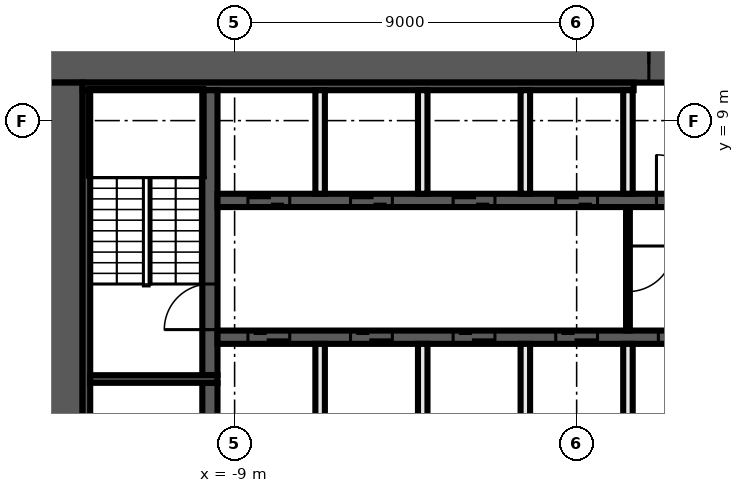
"""IFC4 building model, lengths in metres.
Left out: names, types, materials, properties, quantities, classifications, styles, units other than length and angle.
Written with IfcOpenShell. Run it as: python <this file> out.ifc"""

import sys

from ifc_helpers import new_model, si_unit, direction, frame, frame_2d, origin, place, context, subcontext, project, spatial, rectangle, extrude, element, fill, save


model = new_model("IFC4")
c1 = context("Model", 3, precision=1e-05, world=origin(), true_north=direction((0.0, 1.0)))
c2 = subcontext(c1, "Body", "Model", "MODEL_VIEW")
j1 = project(units=[si_unit("LENGTHUNIT", "METRE"), si_unit("PLANEANGLEUNIT", "RADIAN")], contexts=[c1])
p1 = place(None, origin())
s1 = spatial("IfcSite", under=j1, at=p1, CompositionType="ELEMENT")
p2 = place(p1, origin())
s2 = spatial("IfcBuilding", under=s1, at=p2, CompositionType="ELEMENT")
p3 = place(p2, frame((0.0, 0.0, 98.9)))
s3 = spatial("IfcBuildingStorey", under=s2, at=p3, CompositionType="ELEMENT", Elevation=98.9)
p4 = place(p3, frame((-14.0, 10.5, 0.0), z_axis=(0.0, 0.0, 1.0), x_axis=(1.0, 0.0, 0.0)))
e1 = element("IfcWall", 1, at=p4, inside=s3, PredefinedType="SHEAR", context=c2, shape_type="SweptSolid", body=[
    extrude(rectangle(XDim=28.0, YDim=1.0, at=frame_2d((14.0, 0.0))), origin(), (0.0, 0.0, 1.0), 3.25),
])
p5 = place(p4, frame((15.9, 0.0, 0.0)))
e2 = element("IfcOpeningElement", 2, at=p5, cuts=e1, PredefinedType="OPENING", context=c2, shape_type="SweptSolid", body=[
    extrude(rectangle(XDim=1.6, YDim=2.1, at=frame_2d((0.8, 1.05))), frame((0.0, 0.51, 0.0), z_axis=(0.0, -1.0, 0.0), x_axis=(1.0, 0.0, 0.0)), (0.0, 0.0, 1.0), 1.02),
])
p6 = place(p3, frame((-13.5, -10.0, 0.0), z_axis=(0.0, 0.0, 1.0), x_axis=(0.0, 1.0, 0.0)))
e3 = element("IfcWall", 3, at=p6, inside=s3, PredefinedType="SHEAR", context=c2, shape_type="SweptSolid", body=[
    extrude(rectangle(XDim=20.0, YDim=1.0, at=frame_2d((10.0, 0.0))), origin(), (0.0, 0.0, 1.0), 3.25),
])
p7 = place(p3, frame((-13.0, 9.9, 0.0), z_axis=(0.0, 0.0, 1.0), x_axis=(1.0, 0.0, 0.0)))
e4 = element("IfcWall", 4, at=p7, inside=s3, PredefinedType="SHEAR", context=c2, shape_type="SweptSolid", body=[
    extrude(rectangle(XDim=14.5, YDim=0.2, at=frame_2d((7.25, 0.0))), origin(), (0.0, 0.0, 1.0), 3.25),
])
p8 = place(p3, frame((-12.9, -9.8, 0.0), z_axis=(0.0, 0.0, 1.0), x_axis=(0.0, 1.0, 0.0)))
e5 = element("IfcWall", 5, at=p8, inside=s3, PredefinedType="SHEAR", context=c2, shape_type="SweptSolid", body=[
    extrude(rectangle(XDim=19.6, YDim=0.2, at=frame_2d((9.8, 0.0))), origin(), (0.0, 0.0, 1.0), 3.25),
])
p9 = place(p3, frame((-9.65, -2.1, 0.0), z_axis=(0.0, 0.0, 1.0), x_axis=(0.0, 1.0, 0.0)))
e6 = element("IfcWall", 6, at=p9, inside=s3, PredefinedType="SHEAR", context=c2, shape_type="SweptSolid", body=[
    extrude(rectangle(XDim=4.2, YDim=0.4, at=frame_2d((2.1, 0.0))), origin(), (0.0, 0.0, 1.0), 3.25),
])
p10 = place(p3, frame((-9.65, 2.3, 0.0), z_axis=(0.0, 0.0, 1.0), x_axis=(0.0, 1.0, 0.0)))
e7 = element("IfcWall", 7, at=p10, inside=s3, PredefinedType="SHEAR", context=c2, shape_type="SweptSolid", body=[
    extrude(rectangle(XDim=7.5, YDim=0.4, at=frame_2d((3.75, 0.0))), origin(), (0.0, 0.0, 1.0), 3.25),
])
p11 = place(p10, frame((1.2, 0.0, 0.0)))
e8 = element("IfcOpeningElement", 8, at=p11, cuts=e7, PredefinedType="OPENING", context=c2, shape_type="SweptSolid", body=[
    extrude(rectangle(XDim=1.2, YDim=2.1, at=frame_2d((0.6, 1.05))), frame((0.0, 0.21, 0.0), z_axis=(0.0, -1.0, 0.0), x_axis=(1.0, 0.0, 0.0)), (0.0, 0.0, 1.0), 0.42),
])
p12 = place(p3, frame((-9.45, 2.2, 0.0), z_axis=(0.0, 0.0, 1.0), x_axis=(-1.0, 0.0, 0.0)))
e9 = element("IfcWall", 9, at=p12, inside=s3, PredefinedType="SHEAR", context=c2, shape_type="SweptSolid", body=[
    extrude(rectangle(XDim=3.35, YDim=0.2, at=frame_2d((1.675, 0.0))), origin(), (0.0, 0.0, 1.0), 3.25),
])
p13 = place(p3, frame((-9.45, 6.9, 0.0), z_axis=(0.0, 0.0, 1.0), x_axis=(1.0, 0.0, 0.0)))
e10 = element("IfcWall", 10, at=p13, inside=s3, PredefinedType="SHEAR", context=c2, shape_type="SweptSolid", body=[
    extrude(rectangle(XDim=18.9, YDim=0.35, at=frame_2d((9.45, 0.0))), origin(), (0.0, 0.0, 1.0), 3.25),
])
p14 = place(p13, frame((0.8, 0.0, 0.0)))
e11 = element("IfcOpeningElement", 11, at=p14, cuts=e10, PredefinedType="OPENING", context=c2, shape_type="SweptSolid", body=[
    extrude(rectangle(XDim=1.1, YDim=2.1, at=frame_2d((0.55, 1.05))), frame((0.0, 0.185, 0.0), z_axis=(0.0, -1.0, 0.0), x_axis=(1.0, 0.0, 0.0)), (0.0, 0.0, 1.0), 0.37),
])
p15 = place(p13, frame((3.5, 0.0, 0.0)))
e12 = element("IfcOpeningElement", 12, at=p15, cuts=e10, PredefinedType="OPENING", context=c2, shape_type="SweptSolid", body=[
    extrude(rectangle(XDim=1.1, YDim=2.1, at=frame_2d((0.55, 1.05))), frame((0.0, 0.185, 0.0), z_axis=(0.0, -1.0, 0.0), x_axis=(1.0, 0.0, 0.0)), (0.0, 0.0, 1.0), 0.37),
])
p16 = place(p13, frame((6.2, 0.0, 0.0)))
e13 = element("IfcOpeningElement", 13, at=p16, cuts=e10, PredefinedType="OPENING", context=c2, shape_type="SweptSolid", body=[
    extrude(rectangle(XDim=1.1, YDim=2.1, at=frame_2d((0.55, 1.05))), frame((0.0, 0.185, 0.0), z_axis=(0.0, -1.0, 0.0), x_axis=(1.0, 0.0, 0.0)), (0.0, 0.0, 1.0), 0.37),
])
p17 = place(p13, frame((8.9, 0.0, 0.0)))
e14 = element("IfcOpeningElement", 14, at=p17, cuts=e10, PredefinedType="OPENING", context=c2, shape_type="SweptSolid", body=[
    extrude(rectangle(XDim=1.1, YDim=2.1, at=frame_2d((0.55, 1.05))), frame((0.0, 0.185, 0.0), z_axis=(0.0, -1.0, 0.0), x_axis=(1.0, 0.0, 0.0)), (0.0, 0.0, 1.0), 0.37),
])
p18 = place(p13, frame((11.55, 0.0, 0.0)))
e15 = element("IfcOpeningElement", 15, at=p18, cuts=e10, PredefinedType="OPENING", context=c2, shape_type="SweptSolid", body=[
    extrude(rectangle(XDim=1.2, YDim=2.1, at=frame_2d((0.6, 1.05))), frame((0.0, 0.185, 0.0), z_axis=(0.0, -1.0, 0.0), x_axis=(1.0, 0.0, 0.0)), (0.0, 0.0, 1.0), 0.37),
])
p19 = place(p13, frame((14.3, 0.0, 0.0)))
e16 = element("IfcOpeningElement", 16, at=p19, cuts=e10, PredefinedType="OPENING", context=c2, shape_type="SweptSolid", body=[
    extrude(rectangle(XDim=1.1, YDim=2.1, at=frame_2d((0.55, 1.05))), frame((0.0, 0.185, 0.0), z_axis=(0.0, -1.0, 0.0), x_axis=(1.0, 0.0, 0.0)), (0.0, 0.0, 1.0), 0.37),
])
p20 = place(p13, frame((17.0, 0.0, 0.0)))
e17 = element("IfcOpeningElement", 17, at=p20, cuts=e10, PredefinedType="OPENING", context=c2, shape_type="SweptSolid", body=[
    extrude(rectangle(XDim=1.1, YDim=2.1, at=frame_2d((0.55, 1.05))), frame((0.0, 0.185, 0.0), z_axis=(0.0, -1.0, 0.0), x_axis=(1.0, 0.0, 0.0)), (0.0, 0.0, 1.0), 0.37),
])
p21 = place(p3, frame((9.45, 3.3, 0.0), z_axis=(0.0, 0.0, 1.0), x_axis=(-1.0, 0.0, 0.0)))
e18 = element("IfcWall", 18, at=p21, inside=s3, PredefinedType="SHEAR", context=c2, shape_type="SweptSolid", body=[
    extrude(rectangle(XDim=18.9, YDim=0.35, at=frame_2d((9.45, 0.0))), origin(), (0.0, 0.0, 1.0), 3.25),
])
p22 = place(p21, frame((17.0, 0.0, 0.0)))
e19 = element("IfcOpeningElement", 19, at=p22, cuts=e18, PredefinedType="OPENING", context=c2, shape_type="SweptSolid", body=[
    extrude(rectangle(XDim=1.1, YDim=2.1, at=frame_2d((0.55, 1.05))), frame((0.0, 0.185, 0.0), z_axis=(0.0, -1.0, 0.0), x_axis=(1.0, 0.0, 0.0)), (0.0, 0.0, 1.0), 0.37),
])
p23 = place(p21, frame((14.3, 0.0, 0.0)))
e20 = element("IfcOpeningElement", 20, at=p23, cuts=e18, PredefinedType="OPENING", context=c2, shape_type="SweptSolid", body=[
    extrude(rectangle(XDim=1.1, YDim=2.1, at=frame_2d((0.55, 1.05))), frame((0.0, 0.185, 0.0), z_axis=(0.0, -1.0, 0.0), x_axis=(1.0, 0.0, 0.0)), (0.0, 0.0, 1.0), 0.37),
])
p24 = place(p21, frame((11.6, 0.0, 0.0)))
e21 = element("IfcOpeningElement", 21, at=p24, cuts=e18, PredefinedType="OPENING", context=c2, shape_type="SweptSolid", body=[
    extrude(rectangle(XDim=1.1, YDim=2.1, at=frame_2d((0.55, 1.05))), frame((0.0, 0.185, 0.0), z_axis=(0.0, -1.0, 0.0), x_axis=(1.0, 0.0, 0.0)), (0.0, 0.0, 1.0), 0.37),
])
p25 = place(p21, frame((8.9, 0.0, 0.0)))
e22 = element("IfcOpeningElement", 22, at=p25, cuts=e18, PredefinedType="OPENING", context=c2, shape_type="SweptSolid", body=[
    extrude(rectangle(XDim=1.1, YDim=2.1, at=frame_2d((0.55, 1.05))), frame((0.0, 0.185, 0.0), z_axis=(0.0, -1.0, 0.0), x_axis=(1.0, 0.0, 0.0)), (0.0, 0.0, 1.0), 0.37),
])
p26 = place(p21, frame((6.2, 0.0, 0.0)))
e23 = element("IfcOpeningElement", 23, at=p26, cuts=e18, PredefinedType="OPENING", context=c2, shape_type="SweptSolid", body=[
    extrude(rectangle(XDim=1.1, YDim=2.1, at=frame_2d((0.55, 1.05))), frame((0.0, 0.185, 0.0), z_axis=(0.0, -1.0, 0.0), x_axis=(1.0, 0.0, 0.0)), (0.0, 0.0, 1.0), 0.37),
])
p27 = place(p21, frame((3.5, 0.0, 0.0)))
e24 = element("IfcOpeningElement", 24, at=p27, cuts=e18, PredefinedType="OPENING", context=c2, shape_type="SweptSolid", body=[
    extrude(rectangle(XDim=1.1, YDim=2.1, at=frame_2d((0.55, 1.05))), frame((0.0, 0.185, 0.0), z_axis=(0.0, -1.0, 0.0), x_axis=(1.0, 0.0, 0.0)), (0.0, 0.0, 1.0), 0.37),
])
p28 = place(p21, frame((0.9, 0.0, 0.0)))
e25 = element("IfcOpeningElement", 25, at=p28, cuts=e18, PredefinedType="OPENING", context=c2, shape_type="SweptSolid", body=[
    extrude(rectangle(XDim=0.9, YDim=2.1, at=frame_2d((0.45, 1.05))), frame((0.0, 0.185, 0.0), z_axis=(0.0, -1.0, 0.0), x_axis=(1.0, 0.0, 0.0)), (0.0, 0.0, 1.0), 0.37),
])
p29 = place(p3, frame((1.35, 6.725, 0.0), z_axis=(0.0, 0.0, 1.0), x_axis=(0.0, -1.0, 0.0)))
e26 = element("IfcWall", 26, at=p29, inside=s3, PredefinedType="PARTITIONING", context=c2, shape_type="SweptSolid", body=[
    extrude(rectangle(XDim=3.25, YDim=0.1, at=frame_2d((1.625, 0.0))), origin(), (0.0, 0.0, 1.0), 3.25),
])
p30 = place(p29, frame((1.025, 0.0, 0.0)))
e27 = element("IfcOpeningElement", 27, at=p30, cuts=e26, PredefinedType="OPENING", context=c2, shape_type="SweptSolid", body=[
    extrude(rectangle(XDim=1.2, YDim=2.1, at=frame_2d((0.6, 1.05))), frame((0.0, 0.06, 0.0), z_axis=(0.0, -1.0, 0.0), x_axis=(1.0, 0.0, 0.0)), (0.0, 0.0, 1.0), 0.12),
])
for number, where, z_axis, x_axis in (
    (28, (1.35, 0.4, 0.0), (0.0, 0.0, 1.0), (0.0, 1.0, 0.0)),
    (29, (1.35, 7.075, 0.0), (0.0, 0.0, 1.0), (0.0, 1.0, 0.0)),
    (30, (-1.35, 0.4, 0.0), (0.0, 0.0, 1.0), (0.0, 1.0, 0.0)),
    (31, (-1.35, 7.075, 0.0), (0.0, 0.0, 1.0), (0.0, 1.0, 0.0)),
    (32, (-4.05, 0.4, 0.0), (0.0, 0.0, 1.0), (0.0, 1.0, 0.0)),
    (33, (-4.05, 7.075, 0.0), (0.0, 0.0, 1.0), (0.0, 1.0, 0.0)),
    (34, (-6.75, 0.4, 0.0), (0.0, 0.0, 1.0), (0.0, 1.0, 0.0)),
    (35, (-6.75, 7.075, 0.0), (0.0, 0.0, 1.0), (0.0, 1.0, 0.0)),
):
    element("IfcWall", number, at=place(p3, frame(where, z_axis=z_axis, x_axis=x_axis)), inside=s3, PredefinedType="SOLIDWALL", context=c2, shape_type="SweptSolid", body=[
        extrude(rectangle(XDim=2.725, YDim=0.25, at=frame_2d((1.363, 0.0))), origin(), (0.0, 0.0, 1.0), 3.25),
    ])
p31 = place(p14, origin())
e36 = element("IfcDoor", 36, at=p31, inside=s3, OperationType="DOUBLE_DOOR_SLIDING", PredefinedType="DOOR", context=c2, shape_type="SweptSolid", body=[
    extrude(rectangle(XDim=1.1, YDim=2.1, at=frame_2d((0.55, 1.05))), frame((0.0, 0.025, 0.0), z_axis=(0.0, -1.0, 0.0), x_axis=(1.0, 0.0, 0.0)), (0.0, 0.0, 1.0), 0.05),
])
fill(e11, e36)
p32 = place(p15, origin())
e37 = element("IfcDoor", 37, at=p32, inside=s3, OperationType="DOUBLE_DOOR_SLIDING", PredefinedType="DOOR", context=c2, shape_type="SweptSolid", body=[
    extrude(rectangle(XDim=1.1, YDim=2.1, at=frame_2d((0.55, 1.05))), frame((0.0, 0.025, 0.0), z_axis=(0.0, -1.0, 0.0), x_axis=(1.0, 0.0, 0.0)), (0.0, 0.0, 1.0), 0.05),
])
fill(e12, e37)
p33 = place(p16, origin())
e38 = element("IfcDoor", 38, at=p33, inside=s3, OperationType="DOUBLE_DOOR_SLIDING", PredefinedType="DOOR", context=c2, shape_type="SweptSolid", body=[
    extrude(rectangle(XDim=1.1, YDim=2.1, at=frame_2d((0.55, 1.05))), frame((0.0, 0.025, 0.0), z_axis=(0.0, -1.0, 0.0), x_axis=(1.0, 0.0, 0.0)), (0.0, 0.0, 1.0), 0.05),
])
fill(e13, e38)
p34 = place(p17, origin())
e39 = element("IfcDoor", 39, at=p34, inside=s3, OperationType="DOUBLE_DOOR_SLIDING", PredefinedType="DOOR", context=c2, shape_type="SweptSolid", body=[
    extrude(rectangle(XDim=1.1, YDim=2.1, at=frame_2d((0.55, 1.05))), frame((0.0, 0.025, 0.0), z_axis=(0.0, -1.0, 0.0), x_axis=(1.0, 0.0, 0.0)), (0.0, 0.0, 1.0), 0.05),
])
fill(e14, e39)
p35 = place(p5, origin())
e40 = element("IfcDoor", 40, at=p35, inside=s3, OperationType="DOUBLE_DOOR_SINGLE_SWING", PredefinedType="DOOR", context=c2, shape_type="SweptSolid", body=[
    extrude(rectangle(XDim=1.6, YDim=2.1, at=frame_2d((0.8, 1.05))), frame((0.0, 0.025, 0.0), z_axis=(0.0, -1.0, 0.0), x_axis=(1.0, 0.0, 0.0)), (0.0, 0.0, 1.0), 0.05),
])
fill(e2, e40)
p36 = place(p18, origin())
e41 = element("IfcDoor", 41, at=p36, inside=s3, OperationType="SINGLE_SWING_LEFT", PredefinedType="DOOR", context=c2, shape_type="SweptSolid", body=[
    extrude(rectangle(XDim=1.2, YDim=2.1, at=frame_2d((0.6, 1.05))), frame((0.0, 0.025, 0.0), z_axis=(0.0, -1.0, 0.0), x_axis=(1.0, 0.0, 0.0)), (0.0, 0.0, 1.0), 0.05),
])
fill(e15, e41)
p37 = place(p22, origin())
e42 = element("IfcDoor", 42, at=p37, inside=s3, OperationType="DOUBLE_DOOR_SLIDING", PredefinedType="DOOR", context=c2, shape_type="SweptSolid", body=[
    extrude(rectangle(XDim=1.1, YDim=2.1, at=frame_2d((0.55, 1.05))), frame((0.0, 0.025, 0.0), z_axis=(0.0, -1.0, 0.0), x_axis=(1.0, 0.0, 0.0)), (0.0, 0.0, 1.0), 0.05),
])
fill(e19, e42)
p38 = place(p23, origin())
e43 = element("IfcDoor", 43, at=p38, inside=s3, OperationType="DOUBLE_DOOR_SLIDING", PredefinedType="DOOR", context=c2, shape_type="SweptSolid", body=[
    extrude(rectangle(XDim=1.1, YDim=2.1, at=frame_2d((0.55, 1.05))), frame((0.0, 0.025, 0.0), z_axis=(0.0, -1.0, 0.0), x_axis=(1.0, 0.0, 0.0)), (0.0, 0.0, 1.0), 0.05),
])
fill(e20, e43)
p39 = place(p24, origin())
e44 = element("IfcDoor", 44, at=p39, inside=s3, OperationType="DOUBLE_DOOR_SLIDING", PredefinedType="DOOR", context=c2, shape_type="SweptSolid", body=[
    extrude(rectangle(XDim=1.1, YDim=2.1, at=frame_2d((0.55, 1.05))), frame((0.0, 0.025, 0.0), z_axis=(0.0, -1.0, 0.0), x_axis=(1.0, 0.0, 0.0)), (0.0, 0.0, 1.0), 0.05),
])
fill(e21, e44)
p40 = place(p25, origin())
e45 = element("IfcDoor", 45, at=p40, inside=s3, OperationType="DOUBLE_DOOR_SLIDING", PredefinedType="DOOR", context=c2, shape_type="SweptSolid", body=[
    extrude(rectangle(XDim=1.1, YDim=2.1, at=frame_2d((0.55, 1.05))), frame((0.0, 0.025, 0.0), z_axis=(0.0, -1.0, 0.0), x_axis=(1.0, 0.0, 0.0)), (0.0, 0.0, 1.0), 0.05),
])
fill(e22, e45)
p41 = place(p26, origin())
e46 = element("IfcDoor", 46, at=p41, inside=s3, OperationType="DOUBLE_DOOR_SLIDING", PredefinedType="DOOR", context=c2, shape_type="SweptSolid", body=[
    extrude(rectangle(XDim=1.1, YDim=2.1, at=frame_2d((0.55, 1.05))), frame((0.0, 0.025, 0.0), z_axis=(0.0, -1.0, 0.0), x_axis=(1.0, 0.0, 0.0)), (0.0, 0.0, 1.0), 0.05),
])
fill(e23, e46)
p42 = place(p11, origin())
e47 = element("IfcDoor", 47, at=p42, inside=s3, OperationType="SINGLE_SWING_RIGHT", PredefinedType="DOOR", context=c2, shape_type="SweptSolid", body=[
    extrude(rectangle(XDim=1.2, YDim=2.1, at=frame_2d((0.6, 1.05))), frame((0.0, 0.025, 0.0), z_axis=(0.0, -1.0, 0.0), x_axis=(1.0, 0.0, 0.0)), (0.0, 0.0, 1.0), 0.05),
])
fill(e8, e47)
p43 = place(p30, origin())
e48 = element("IfcDoor", 48, at=p43, inside=s3, OperationType="SINGLE_SWING_LEFT", PredefinedType="DOOR", context=c2, shape_type="SweptSolid", body=[
    extrude(rectangle(XDim=1.2, YDim=2.1, at=frame_2d((0.6, 1.05))), frame((0.0, 0.025, 0.0), z_axis=(0.0, -1.0, 0.0), x_axis=(1.0, 0.0, 0.0)), (0.0, 0.0, 1.0), 0.05),
])
fill(e27, e48)
save(model, sys.argv[1])
